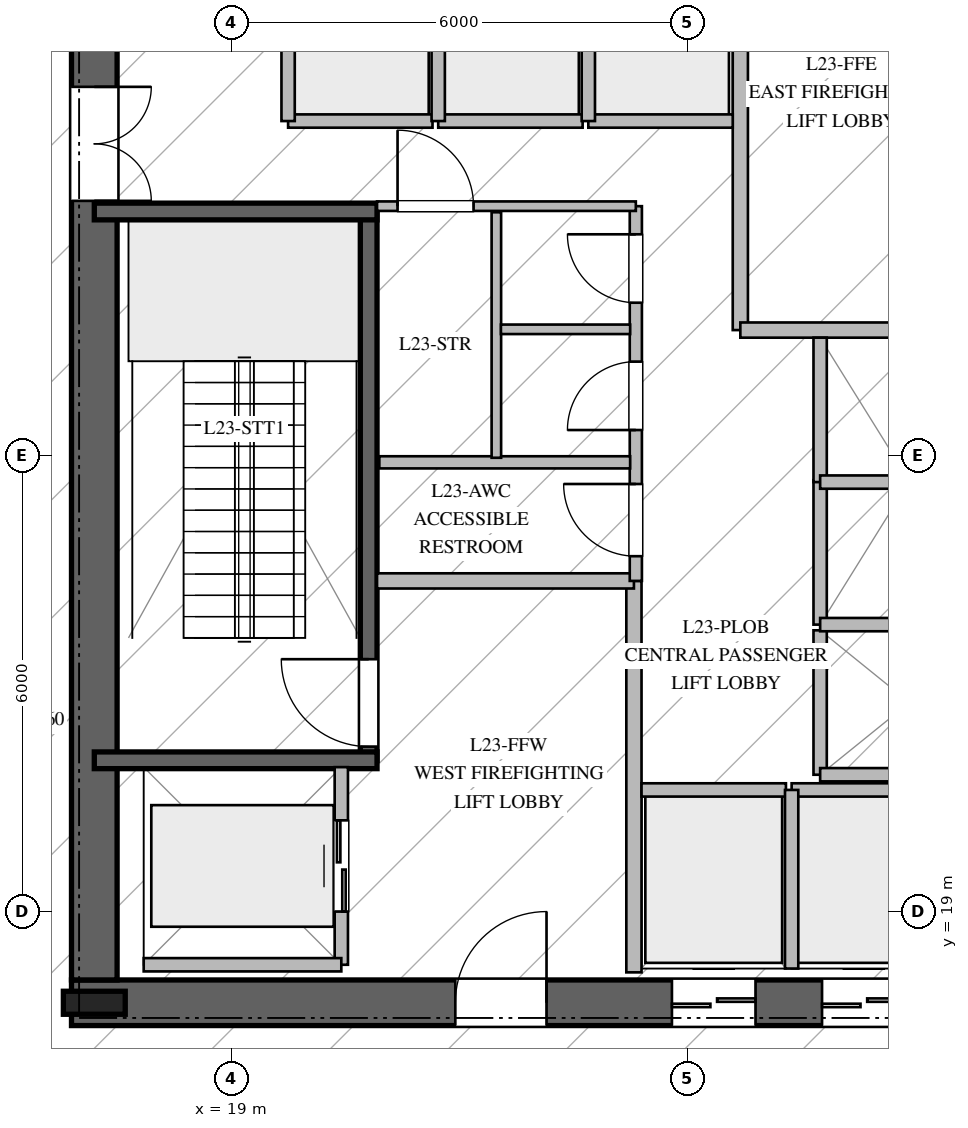
"""IFC4 building model, lengths in metres.
Left out: names, types, materials, properties, quantities, classifications, styles, units other than length and angle.
Written with IfcOpenShell. Run it as: python <this file> out.ifc"""

import sys

from ifc_helpers import new_model, si_unit, direction, frame, frame_2d, origin, origin_2d, place, context, subcontext, project, spatial, rectangle, i_section, extrude, element, fill, save


model = new_model("IFC4")
c1 = context("Model", 3, precision=1e-05, world=origin(), true_north=direction((0.0, 1.0)))
c2 = subcontext(c1, "Body", "Model", "MODEL_VIEW")
j1 = project(units=[si_unit("LENGTHUNIT", "METRE"), si_unit("PLANEANGLEUNIT", "RADIAN")], contexts=[c1])
p1 = place(None, origin())
s1 = spatial("IfcSite", under=j1, at=p1, CompositionType="ELEMENT")
p2 = place(p1, origin())
s2 = spatial("IfcBuilding", under=s1, at=p2, CompositionType="ELEMENT")
p3 = place(p2, frame((0.0, 0.0, 97.4)))
s3 = spatial("IfcBuildingStorey", under=s2, at=p3, CompositionType="ELEMENT", Elevation=97.4)
p4 = place(p3, frame((16.9, 17.8, 0.0), z_axis=(0.0, 0.0, 1.0), x_axis=(1.0, 0.0, 0.0)))
e1 = element("IfcWall", 1, at=p4, inside=s3, PredefinedType="SHEAR", context=c2, shape_type="SweptSolid", body=[
    extrude(rectangle(XDim=16.2, YDim=0.6, at=frame_2d((8.1, 0.0))), origin(), (0.0, 0.0, 1.0), 4.76),
])
p5 = place(p4, frame((5.05, 0.0, 0.0)))
e2 = element("IfcOpeningElement", 2, at=p5, cuts=e1, PredefinedType="OPENING", context=c2, shape_type="SweptSolid", body=[
    extrude(rectangle(XDim=1.2, YDim=2.25, at=frame_2d((0.6, 1.125))), frame((0.0, 0.31, 0.0), z_axis=(0.0, -1.0, 0.0), x_axis=(1.0, 0.0, 0.0)), (0.0, 0.0, 1.0), 0.62),
])
p6 = place(p4, frame((14.0, 0.0, 0.0)))
e3 = element("IfcOpeningElement", 3, at=p6, cuts=e1, PredefinedType="OPENING", context=c2, shape_type="SweptSolid", body=[
    extrude(rectangle(XDim=0.9, YDim=2.1, at=frame_2d((0.45, 1.05))), frame((0.0, 0.31, 0.0), z_axis=(0.0, -1.0, 0.0), x_axis=(1.0, 0.0, 0.0)), (0.0, 0.0, 1.0), 0.62),
])
p7 = place(p4, frame((7.9, 0.0, 0.0)))
e4 = element("IfcOpeningElement", 4, at=p7, cuts=e1, PredefinedType="OPENING", context=c2, shape_type="SweptSolid", body=[
    extrude(rectangle(XDim=1.1, YDim=2.2, at=frame_2d((0.55, 1.1))), frame((0.0, 0.31, 0.0), z_axis=(0.0, -1.0, 0.0), x_axis=(1.0, 0.0, 0.0)), (0.0, 0.0, 1.0), 0.62),
])
p8 = place(p4, frame((9.875, 0.0, 0.0)))
e5 = element("IfcOpeningElement", 5, at=p8, cuts=e1, PredefinedType="OPENING", context=c2, shape_type="SweptSolid", body=[
    extrude(rectangle(XDim=1.1, YDim=2.2, at=frame_2d((0.55, 1.1))), frame((0.0, 0.31, 0.0), z_axis=(0.0, -1.0, 0.0), x_axis=(1.0, 0.0, 0.0)), (0.0, 0.0, 1.0), 0.62),
])
p9 = place(p4, frame((11.85, 0.0, 0.0)))
e6 = element("IfcOpeningElement", 6, at=p9, cuts=e1, PredefinedType="OPENING", context=c2, shape_type="SweptSolid", body=[
    extrude(rectangle(XDim=1.1, YDim=2.2, at=frame_2d((0.55, 1.1))), frame((0.0, 0.31, 0.0), z_axis=(0.0, -1.0, 0.0), x_axis=(1.0, 0.0, 0.0)), (0.0, 0.0, 1.0), 0.62),
])
p10 = place(p3, frame((17.2, 31.9, 0.0), z_axis=(0.0, 0.0, 1.0), x_axis=(0.0, -1.0, 0.0)))
e7 = element("IfcWall", 7, at=p10, inside=s3, PredefinedType="SHEAR", context=c2, shape_type="SweptSolid", body=[
    extrude(rectangle(XDim=13.8, YDim=0.6, at=frame_2d((6.9, 0.0))), origin(), (0.0, 0.0, 1.0), 4.76),
])
p11 = place(p10, frame((2.05, 0.0, 0.0)))
e8 = element("IfcOpeningElement", 8, at=p11, cuts=e7, PredefinedType="OPENING", context=c2, shape_type="SweptSolid", body=[
    extrude(rectangle(XDim=1.5, YDim=2.2, at=frame_2d((0.75, 1.1))), frame((0.0, 0.31, 0.0), z_axis=(0.0, -1.0, 0.0), x_axis=(1.0, 0.0, 0.0)), (0.0, 0.0, 1.0), 0.62),
])
p12 = place(p3, frame((17.2, 17.8, 0.0), z_axis=(0.0, 0.0, 1.0), x_axis=(1.0, 0.0, 0.0)))
e9 = element("IfcColumn", 9, at=p12, inside=s3, PredefinedType="COLUMN", context=c2, shape_type="SweptSolid", body=[
    extrude(i_section(OverallWidth=0.303, OverallDepth=0.814, WebThickness=0.021, FlangeThickness=0.04, at=origin_2d()), origin(), (0.0, 0.0, 1.0), 5.0),
])
p13 = place(p3, frame((20.81, 20.99, 0.0), z_axis=(0.0, 0.0, 1.0), x_axis=(0.0, 1.0, 0.0)))
e10 = element("IfcWall", 10, at=p13, inside=s3, PredefinedType="SOLIDWALL", context=c2, shape_type="SweptSolid", body=[
    extrude(rectangle(XDim=7.22, YDim=0.22, at=frame_2d((3.61, 0.0))), origin(), (0.0, 0.0, 1.0), 4.76),
])
p14 = place(p13, frame((0.18, 0.0, 0.0)))
e11 = element("IfcOpeningElement", 11, at=p14, cuts=e10, PredefinedType="OPENING", context=c2, shape_type="SweptSolid", body=[
    extrude(rectangle(XDim=1.15, YDim=2.2, at=frame_2d((0.575, 1.1))), frame((0.0, 0.12, 0.0), z_axis=(0.0, -1.0, 0.0), x_axis=(1.0, 0.0, 0.0)), (0.0, 0.0, 1.0), 0.24),
])
for number, where, z_axis, x_axis in (
    (12, (17.2, 20.99, 0.0), (0.0, 0.0, 1.0), (1.0, 0.0, 0.0)),
    (13, (17.2, 28.21, 0.0), (0.0, 0.0, 1.0), (1.0, 0.0, 0.0)),
):
    element("IfcWall", number, at=place(p3, frame(where, z_axis=z_axis, x_axis=x_axis)), inside=s3, PredefinedType="SOLIDWALL", context=c2, shape_type="SweptSolid", body=[
        extrude(rectangle(XDim=3.72, YDim=0.22, at=frame_2d((1.86, 0.0))), origin(), (0.0, 0.0, 1.0), 4.76),
    ])
p15 = place(p3, frame((24.3, 18.2, 0.0), z_axis=(0.0, 0.0, 1.0), x_axis=(0.0, 1.0, 0.0)))
e14 = element("IfcWall", 14, at=p15, inside=s3, PredefinedType="PARTITIONING", context=c2, shape_type="SweptSolid", body=[
    extrude(rectangle(XDim=5.15, YDim=0.2, at=frame_2d((2.575, 0.0))), origin(), (0.0, 0.0, 1.0), 4.76),
])
p16 = place(p3, frame((20.92, 23.35, 0.0), z_axis=(0.0, 0.0, 1.0), x_axis=(1.0, 0.0, 0.0)))
e15 = element("IfcWall", 15, at=p16, inside=s3, PredefinedType="PARTITIONING", context=c2, shape_type="SweptSolid", body=[
    extrude(rectangle(XDim=3.38, YDim=0.2, at=frame_2d((1.69, 0.0))), origin(), (0.0, 0.0, 1.0), 4.76),
])
p17 = place(p3, frame((25.7, 26.65, 0.0), z_axis=(0.0, 0.0, 1.0), x_axis=(0.0, 1.0, 0.0)))
e16 = element("IfcWall", 16, at=p17, inside=s3, PredefinedType="PARTITIONING", context=c2, shape_type="SweptSolid", body=[
    extrude(rectangle(XDim=5.15, YDim=0.2, at=frame_2d((2.575, 0.0))), origin(), (0.0, 0.0, 1.0), 4.76),
])
p18 = place(p3, frame((25.7, 26.65, 0.0), z_axis=(0.0, 0.0, 1.0), x_axis=(1.0, 0.0, 0.0)))
e17 = element("IfcWall", 17, at=p18, inside=s3, PredefinedType="PARTITIONING", context=c2, shape_type="SweptSolid", body=[
    extrude(rectangle(XDim=3.38, YDim=0.2, at=frame_2d((1.69, 0.0))), origin(), (0.0, 0.0, 1.0), 4.76),
])
p19 = place(p3, frame((24.325, 23.35, 0.0), z_axis=(0.0, 0.0, 1.0), x_axis=(0.0, 1.0, 0.0)))
e18 = element("IfcWall", 18, at=p19, inside=s3, PredefinedType="PLUMBINGWALL", context=c2, shape_type="SweptSolid", body=[
    extrude(rectangle(XDim=4.93, YDim=0.16, at=frame_2d((2.465, 0.0))), origin(), (0.0, 0.0, 1.0), 4.76),
])
p20 = place(p19, frame((0.325, 0.0, 0.0)))
e19 = element("IfcOpeningElement", 19, at=p20, cuts=e18, PredefinedType="OPENING", context=c2, shape_type="SweptSolid", body=[
    extrude(rectangle(XDim=0.95, YDim=2.1, at=frame_2d((0.475, 1.05))), frame((0.0, 0.09, 0.0), z_axis=(0.0, -1.0, 0.0), x_axis=(1.0, 0.0, 0.0)), (0.0, 0.0, 1.0), 0.18),
])
p21 = place(p19, frame((1.985, 0.0, 0.0)))
e20 = element("IfcOpeningElement", 20, at=p21, cuts=e18, PredefinedType="OPENING", context=c2, shape_type="SweptSolid", body=[
    extrude(rectangle(XDim=0.9, YDim=2.1, at=frame_2d((0.45, 1.05))), frame((0.0, 0.09, 0.0), z_axis=(0.0, -1.0, 0.0), x_axis=(1.0, 0.0, 0.0)), (0.0, 0.0, 1.0), 0.18),
])
p22 = place(p19, frame((3.66, 0.0, 0.0)))
e21 = element("IfcOpeningElement", 21, at=p22, cuts=e18, PredefinedType="OPENING", context=c2, shape_type="SweptSolid", body=[
    extrude(rectangle(XDim=0.9, YDim=2.1, at=frame_2d((0.45, 1.05))), frame((0.0, 0.09, 0.0), z_axis=(0.0, -1.0, 0.0), x_axis=(1.0, 0.0, 0.0)), (0.0, 0.0, 1.0), 0.18),
])
p23 = place(p3, frame((20.92, 28.28, 0.0), z_axis=(0.0, 0.0, 1.0), x_axis=(1.0, 0.0, 0.0)))
e22 = element("IfcWall", 22, at=p23, inside=s3, PredefinedType="PARTITIONING", context=c2, shape_type="SweptSolid", body=[
    extrude(rectangle(XDim=3.405, YDim=0.125, at=frame_2d((1.703, 0.0))), origin(), (0.0, 0.0, 1.0), 4.76),
])
p24 = place(p23, frame((0.27, 0.0, 0.0)))
e23 = element("IfcOpeningElement", 23, at=p24, cuts=e22, PredefinedType="OPENING", context=c2, shape_type="SweptSolid", body=[
    extrude(rectangle(XDim=1.0, YDim=2.15, at=frame_2d((0.5, 1.075))), frame((0.0, 0.073, 0.0), z_axis=(0.0, -1.0, 0.0), x_axis=(1.0, 0.0, 0.0)), (0.0, 0.0, 1.0), 0.145),
])
p25 = place(p3, frame((20.95, 24.91, 0.0), z_axis=(0.0, 0.0, 1.0), x_axis=(1.0, 0.0, 0.0)))
e24 = element("IfcWall", 24, at=p25, inside=s3, PredefinedType="PLUMBINGWALL", context=c2, shape_type="SweptSolid", body=[
    extrude(rectangle(XDim=3.3, YDim=0.16, at=frame_2d((1.65, 0.0))), origin(), (0.0, 0.0, 1.0), 4.76),
])
p26 = place(p3, frame((22.49, 24.97, 0.0), z_axis=(0.0, 0.0, 1.0), x_axis=(0.0, 1.0, 0.0)))
e25 = element("IfcWall", 25, at=p26, inside=s3, PredefinedType="PARTITIONING", context=c2, shape_type="SweptSolid", body=[
    extrude(rectangle(XDim=3.23, YDim=0.125, at=frame_2d((1.615, 0.0))), origin(), (0.0, 0.0, 1.0), 4.76),
])
p27 = place(p3, frame((22.55, 26.66, 0.0), z_axis=(0.0, 0.0, 1.0), x_axis=(1.0, 0.0, 0.0)))
e26 = element("IfcWall", 26, at=p27, inside=s3, PredefinedType="PARTITIONING", context=c2, shape_type="SweptSolid", body=[
    extrude(rectangle(XDim=1.7, YDim=0.125, at=frame_2d((0.85, 0.0))), origin(), (0.0, 0.0, 1.0), 4.76),
])
p28 = place(p3, frame((24.4, 20.6, 0.0), z_axis=(0.0, 0.0, 1.0), x_axis=(1.0, 0.0, 0.0)))
e27 = element("IfcWall", 27, at=p28, inside=s3, PredefinedType="PARTITIONING", context=c2, shape_type="SweptSolid", body=[
    extrude(rectangle(XDim=1.9, YDim=0.175, at=frame_2d((0.95, 0.0))), origin(), (0.0, 0.0, 1.0), 4.76),
])
p29 = place(p3, frame((26.375, 20.6, 0.0), z_axis=(0.0, 0.0, 1.0), x_axis=(1.0, 0.0, 0.0)))
e28 = element("IfcWall", 28, at=p29, inside=s3, PredefinedType="PARTITIONING", context=c2, shape_type="SweptSolid", body=[
    extrude(rectangle(XDim=1.9, YDim=0.175, at=frame_2d((0.95, 0.0))), origin(), (0.0, 0.0, 1.0), 4.76),
])
p30 = place(p3, frame((26.375, 18.25, 0.0), z_axis=(0.0, 0.0, 1.0), x_axis=(0.0, 1.0, 0.0)))
e29 = element("IfcWall", 29, at=p30, inside=s3, PredefinedType="PARTITIONING", context=c2, shape_type="SweptSolid", body=[
    extrude(rectangle(XDim=2.35, YDim=0.175, at=frame_2d((1.175, 0.0))), origin(), (0.0, 0.0, 1.0), 4.76),
])
p31 = place(p3, frame((19.75, 29.4, 0.0), z_axis=(0.0, 0.0, 1.0), x_axis=(1.0, 0.0, 0.0)))
e30 = element("IfcWall", 30, at=p31, inside=s3, PredefinedType="PARTITIONING", context=c2, shape_type="SweptSolid", body=[
    extrude(rectangle(XDim=1.9, YDim=0.175, at=frame_2d((0.95, 0.0))), origin(), (0.0, 0.0, 1.0), 4.76),
])
p32 = place(p3, frame((19.75, 29.4, 0.0), z_axis=(0.0, 0.0, 1.0), x_axis=(0.0, 1.0, 0.0)))
e31 = element("IfcWall", 31, at=p32, inside=s3, PredefinedType="PARTITIONING", context=c2, shape_type="SweptSolid", body=[
    extrude(rectangle(XDim=2.35, YDim=0.175, at=frame_2d((1.175, 0.0))), origin(), (0.0, 0.0, 1.0), 4.76),
])
p33 = place(p3, frame((21.725, 29.4, 0.0), z_axis=(0.0, 0.0, 1.0), x_axis=(1.0, 0.0, 0.0)))
e32 = element("IfcWall", 32, at=p33, inside=s3, PredefinedType="PARTITIONING", context=c2, shape_type="SweptSolid", body=[
    extrude(rectangle(XDim=1.9, YDim=0.175, at=frame_2d((0.95, 0.0))), origin(), (0.0, 0.0, 1.0), 4.76),
])
p34 = place(p3, frame((21.725, 29.4, 0.0), z_axis=(0.0, 0.0, 1.0), x_axis=(0.0, 1.0, 0.0)))
e33 = element("IfcWall", 33, at=p34, inside=s3, PredefinedType="PARTITIONING", context=c2, shape_type="SweptSolid", body=[
    extrude(rectangle(XDim=2.35, YDim=0.175, at=frame_2d((1.175, 0.0))), origin(), (0.0, 0.0, 1.0), 4.76),
])
p35 = place(p3, frame((23.7, 29.4, 0.0), z_axis=(0.0, 0.0, 1.0), x_axis=(1.0, 0.0, 0.0)))
e34 = element("IfcWall", 34, at=p35, inside=s3, PredefinedType="PARTITIONING", context=c2, shape_type="SweptSolid", body=[
    extrude(rectangle(XDim=1.9, YDim=0.175, at=frame_2d((0.95, 0.0))), origin(), (0.0, 0.0, 1.0), 4.76),
])
p36 = place(p3, frame((23.7, 29.4, 0.0), z_axis=(0.0, 0.0, 1.0), x_axis=(0.0, 1.0, 0.0)))
e35 = element("IfcWall", 35, at=p36, inside=s3, PredefinedType="PARTITIONING", context=c2, shape_type="SweptSolid", body=[
    extrude(rectangle(XDim=2.35, YDim=0.175, at=frame_2d((1.175, 0.0))), origin(), (0.0, 0.0, 1.0), 4.76),
])
p37 = place(p3, frame((26.75, 20.8, 0.0), z_axis=(0.0, 0.0, 1.0), x_axis=(0.0, 1.0, 0.0)))
e36 = element("IfcWall", 36, at=p37, inside=s3, PredefinedType="PARTITIONING", context=c2, shape_type="SweptSolid", body=[
    extrude(rectangle(XDim=1.9, YDim=0.175, at=frame_2d((0.95, 0.0))), origin(), (0.0, 0.0, 1.0), 4.76),
])
p38 = place(p3, frame((26.75, 20.8, 0.0), z_axis=(0.0, 0.0, 1.0), x_axis=(1.0, 0.0, 0.0)))
e37 = element("IfcWall", 37, at=p38, inside=s3, PredefinedType="PARTITIONING", context=c2, shape_type="SweptSolid", body=[
    extrude(rectangle(XDim=2.35, YDim=0.175, at=frame_2d((1.175, 0.0))), origin(), (0.0, 0.0, 1.0), 4.76),
])
p39 = place(p3, frame((26.75, 22.775, 0.0), z_axis=(0.0, 0.0, 1.0), x_axis=(0.0, 1.0, 0.0)))
e38 = element("IfcWall", 38, at=p39, inside=s3, PredefinedType="PARTITIONING", context=c2, shape_type="SweptSolid", body=[
    extrude(rectangle(XDim=1.9, YDim=0.175, at=frame_2d((0.95, 0.0))), origin(), (0.0, 0.0, 1.0), 4.76),
])
p40 = place(p3, frame((26.75, 22.775, 0.0), z_axis=(0.0, 0.0, 1.0), x_axis=(1.0, 0.0, 0.0)))
e39 = element("IfcWall", 39, at=p40, inside=s3, PredefinedType="PARTITIONING", context=c2, shape_type="SweptSolid", body=[
    extrude(rectangle(XDim=2.35, YDim=0.175, at=frame_2d((1.175, 0.0))), origin(), (0.0, 0.0, 1.0), 4.76),
])
p41 = place(p3, frame((26.75, 24.65, 0.0), z_axis=(0.0, 0.0, 1.0), x_axis=(0.0, 1.0, 0.0)))
e40 = element("IfcWall", 40, at=p41, inside=s3, PredefinedType="PARTITIONING", context=c2, shape_type="SweptSolid", body=[
    extrude(rectangle(XDim=1.9, YDim=0.175, at=frame_2d((0.95, 0.0))), origin(), (0.0, 0.0, 1.0), 4.76),
])
p42 = place(p3, frame((26.75, 24.65, 0.0), z_axis=(0.0, 0.0, 1.0), x_axis=(1.0, 0.0, 0.0)))
e41 = element("IfcWall", 41, at=p42, inside=s3, PredefinedType="PARTITIONING", context=c2, shape_type="SweptSolid", body=[
    extrude(rectangle(XDim=2.35, YDim=0.175, at=frame_2d((1.175, 0.0))), origin(), (0.0, 0.0, 1.0), 4.76),
])
p43 = place(p3, frame((20.45, 18.3, 0.0), z_axis=(0.0, 0.0, 1.0), x_axis=(0.0, 1.0, 0.0)))
e42 = element("IfcWall", 42, at=p43, inside=s3, PredefinedType="PARTITIONING", context=c2, shape_type="SweptSolid", body=[
    extrude(rectangle(XDim=2.6, YDim=0.175, at=frame_2d((1.3, 0.0))), origin(), (0.0, 0.0, 1.0), 4.76),
])
p44 = place(p43, frame((0.7, 0.0, 0.0)))
e43 = element("IfcOpeningElement", 43, at=p44, cuts=e42, PredefinedType="OPENING", context=c2, shape_type="SweptSolid", body=[
    extrude(rectangle(XDim=1.2, YDim=2.2, at=frame_2d((0.6, 1.1))), frame((0.0, 0.098, 0.0), z_axis=(0.0, -1.0, 0.0), x_axis=(1.0, 0.0, 0.0)), (0.0, 0.0, 1.0), 0.195),
])
p45 = place(p3, frame((17.85, 18.3, 0.0), z_axis=(0.0, 0.0, 1.0), x_axis=(1.0, 0.0, 0.0)))
e44 = element("IfcWall", 44, at=p45, inside=s3, PredefinedType="PARTITIONING", context=c2, shape_type="SweptSolid", body=[
    extrude(rectangle(XDim=2.6, YDim=0.175, at=frame_2d((1.3, 0.0))), origin(), (0.0, 0.0, 1.0), 4.76),
])
p46 = place(p14, origin())
e45 = element("IfcDoor", 45, at=p46, inside=s3, OperationType="SINGLE_SWING_RIGHT", PredefinedType="DOOR", context=c2, shape_type="SweptSolid", body=[
    extrude(rectangle(XDim=1.15, YDim=2.2, at=frame_2d((0.575, 1.1))), frame((0.0, 0.025, 0.0), z_axis=(0.0, -1.0, 0.0), x_axis=(1.0, 0.0, 0.0)), (0.0, 0.0, 1.0), 0.05),
])
fill(e11, e45)
p47 = place(p5, origin())
e46 = element("IfcDoor", 46, at=p47, inside=s3, OperationType="SINGLE_SWING_RIGHT", PredefinedType="DOOR", context=c2, shape_type="SweptSolid", body=[
    extrude(rectangle(XDim=1.2, YDim=2.25, at=frame_2d((0.6, 1.125))), frame((0.0, 0.025, 0.0), z_axis=(0.0, -1.0, 0.0), x_axis=(1.0, 0.0, 0.0)), (0.0, 0.0, 1.0), 0.05),
])
fill(e2, e46)
p48 = place(p11, origin())
e47 = element("IfcDoor", 47, at=p48, inside=s3, OperationType="DOUBLE_DOOR_SINGLE_SWING", PredefinedType="DOOR", context=c2, shape_type="SweptSolid", body=[
    extrude(rectangle(XDim=1.5, YDim=2.2, at=frame_2d((0.75, 1.1))), frame((0.0, 0.025, 0.0), z_axis=(0.0, -1.0, 0.0), x_axis=(1.0, 0.0, 0.0)), (0.0, 0.0, 1.0), 0.05),
])
fill(e8, e47)
p49 = place(p20, origin())
e48 = element("IfcDoor", 48, at=p49, inside=s3, OperationType="SINGLE_SWING_RIGHT", PredefinedType="DOOR", context=c2, shape_type="SweptSolid", body=[
    extrude(rectangle(XDim=0.95, YDim=2.1, at=frame_2d((0.475, 1.05))), frame((0.0, 0.025, 0.0), z_axis=(0.0, -1.0, 0.0), x_axis=(1.0, 0.0, 0.0)), (0.0, 0.0, 1.0), 0.05),
])
fill(e19, e48)
p50 = place(p21, origin())
e49 = element("IfcDoor", 49, at=p50, inside=s3, OperationType="SINGLE_SWING_LEFT", PredefinedType="DOOR", context=c2, shape_type="SweptSolid", body=[
    extrude(rectangle(XDim=0.9, YDim=2.1, at=frame_2d((0.45, 1.05))), frame((0.0, 0.025, 0.0), z_axis=(0.0, -1.0, 0.0), x_axis=(1.0, 0.0, 0.0)), (0.0, 0.0, 1.0), 0.05),
])
fill(e20, e49)
p51 = place(p22, origin())
e50 = element("IfcDoor", 50, at=p51, inside=s3, OperationType="SINGLE_SWING_RIGHT", PredefinedType="DOOR", context=c2, shape_type="SweptSolid", body=[
    extrude(rectangle(XDim=0.9, YDim=2.1, at=frame_2d((0.45, 1.05))), frame((0.0, 0.025, 0.0), z_axis=(0.0, -1.0, 0.0), x_axis=(1.0, 0.0, 0.0)), (0.0, 0.0, 1.0), 0.05),
])
fill(e21, e50)
p52 = place(p24, origin())
e51 = element("IfcDoor", 51, at=p52, inside=s3, OperationType="SINGLE_SWING_LEFT", PredefinedType="DOOR", context=c2, shape_type="SweptSolid", body=[
    extrude(rectangle(XDim=1.0, YDim=2.15, at=frame_2d((0.5, 1.075))), frame((0.0, 0.025, 0.0), z_axis=(0.0, -1.0, 0.0), x_axis=(1.0, 0.0, 0.0)), (0.0, 0.0, 1.0), 0.05),
])
fill(e23, e51)
p53 = place(p7, origin())
e52 = element("IfcDoor", 52, at=p53, inside=s3, OperationType="DOUBLE_DOOR_SLIDING", PredefinedType="DOOR", context=c2, shape_type="SweptSolid", body=[
    extrude(rectangle(XDim=1.1, YDim=2.2, at=frame_2d((0.55, 1.1))), frame((0.0, 0.025, 0.0), z_axis=(0.0, -1.0, 0.0), x_axis=(1.0, 0.0, 0.0)), (0.0, 0.0, 1.0), 0.05),
])
fill(e4, e52)
p54 = place(p8, origin())
e53 = element("IfcDoor", 53, at=p54, inside=s3, OperationType="DOUBLE_DOOR_SLIDING", PredefinedType="DOOR", context=c2, shape_type="SweptSolid", body=[
    extrude(rectangle(XDim=1.1, YDim=2.2, at=frame_2d((0.55, 1.1))), frame((0.0, 0.025, 0.0), z_axis=(0.0, -1.0, 0.0), x_axis=(1.0, 0.0, 0.0)), (0.0, 0.0, 1.0), 0.05),
])
fill(e5, e53)
p55 = place(p44, origin())
e54 = element("IfcDoor", 54, at=p55, inside=s3, OperationType="DOUBLE_DOOR_SLIDING", PredefinedType="DOOR", context=c2, shape_type="SweptSolid", body=[
    extrude(rectangle(XDim=1.2, YDim=2.2, at=frame_2d((0.6, 1.1))), frame((0.0, 0.025, 0.0), z_axis=(0.0, -1.0, 0.0), x_axis=(1.0, 0.0, 0.0)), (0.0, 0.0, 1.0), 0.05),
])
fill(e43, e54)
save(model, sys.argv[1])
